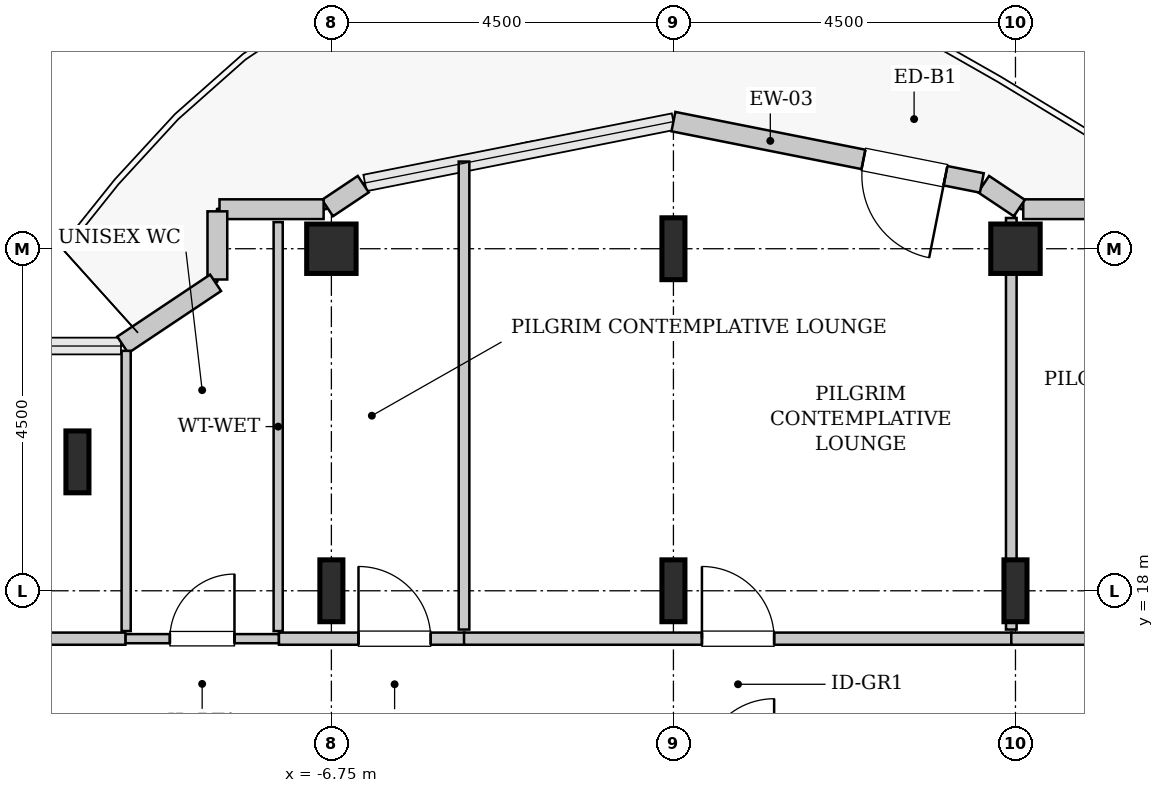
"""IFC4 building model, lengths in metres.
Left out: names, types, materials, properties, quantities, classifications, styles, units other than length and angle.
Written with IfcOpenShell. Run it as: python <this file> out.ifc"""

import sys

from ifc_helpers import new_model, si_unit, direction, frame, frame_2d, origin, origin_2d, place, context, subcontext, project, spatial, rectangle, hollow_rectangle, i_section, extrude, source, transform, mapped, element, fill, save


model = new_model("IFC4")
c1 = context("Model", 3, precision=1e-05, world=origin(), true_north=direction((0.0, 1.0)))
c2 = subcontext(c1, "Body", "Model", "MODEL_VIEW")
j1 = project(units=[si_unit("LENGTHUNIT", "METRE"), si_unit("PLANEANGLEUNIT", "RADIAN")], contexts=[c1])
p1 = place(None, origin())
s1 = spatial("IfcSite", under=j1, at=p1, CompositionType="ELEMENT")
p2 = place(p1, origin())
s2 = spatial("IfcBuilding", under=s1, at=p2, CompositionType="ELEMENT")
p3 = place(p2, frame((0.0, 0.0, 248.4)))
s3 = spatial("IfcBuildingStorey", under=s2, at=p3, CompositionType="ELEMENT", Elevation=248.4)
m1 = source(origin(), c2, "Body", "SweptSolid", [
    extrude(i_section(OverallWidth=0.303, OverallDepth=0.814, WebThickness=0.021, FlangeThickness=0.04, FilletRadius=0.03, at=origin_2d()), origin(), (0.0, 0.0, 1.0), 3.8),
])
for number, where, z_axis, x_axis in (
    (1, (-10.091, 19.696, 0.0), (0.0, 0.0, 1.0), (1.0, 0.0, 0.0)),
    (2, (-6.75, 18.0, 0.0), (0.0, 0.0, 1.0), (1.0, 0.0, 0.0)),
):
    element("IfcColumn", number, at=place(p3, frame(where, z_axis=z_axis, x_axis=x_axis)), inside=s3, PredefinedType="COLUMN", context=c2, shape_type="MappedRepresentation", body=[
        mapped(m1, transform((0.0, 0.0, 0.0), x_axis=(1.0, 0.0, 0.0), y_axis=(0.0, 1.0, 0.0), z_axis=(0.0, 0.0, 1.0), scale=1.0)),
    ])
m2 = source(origin(), c2, "Body", "SweptSolid", [
    extrude(hollow_rectangle(XDim=0.65, YDim=0.65, WallThickness=0.032, InnerFilletRadius=0.032, OuterFilletRadius=0.064, at=origin_2d()), origin(), (0.0, 0.0, 1.0), 3.8),
])
p4 = place(p3, frame((-6.75, 22.5, 0.0), z_axis=(0.0, 0.0, 1.0), x_axis=(1.0, 0.0, 0.0)))
e3 = element("IfcColumn", 3, at=p4, inside=s3, PredefinedType="COLUMN", context=c2, shape_type="MappedRepresentation", body=[
    mapped(m2, transform((0.0, 0.0, 0.0), x_axis=(1.0, 0.0, 0.0), y_axis=(0.0, 1.0, 0.0), z_axis=(0.0, 0.0, 1.0), scale=1.0)),
])
for number, where, z_axis, x_axis in (
    (4, (-2.25, 18.0, 0.0), (0.0, 0.0, 1.0), (1.0, 0.0, 0.0)),
    (5, (-2.25, 22.5, 0.0), (0.0, 0.0, 1.0), (1.0, 0.0, 0.0)),
    (6, (2.25, 18.0, 0.0), (0.0, 0.0, 1.0), (1.0, 0.0, 0.0)),
):
    element("IfcColumn", number, at=place(p3, frame(where, z_axis=z_axis, x_axis=x_axis)), inside=s3, PredefinedType="COLUMN", context=c2, shape_type="MappedRepresentation", body=[
        mapped(m1, transform((0.0, 0.0, 0.0), x_axis=(1.0, 0.0, 0.0), y_axis=(0.0, 1.0, 0.0), z_axis=(0.0, 0.0, 1.0), scale=1.0)),
    ])
p5 = place(p3, frame((2.25, 22.5, 0.0), z_axis=(0.0, 0.0, 1.0), x_axis=(1.0, 0.0, 0.0)))
e7 = element("IfcColumn", 7, at=p5, inside=s3, PredefinedType="COLUMN", context=c2, shape_type="MappedRepresentation", body=[
    mapped(m2, transform((0.0, 0.0, 0.0), x_axis=(1.0, 0.0, 0.0), y_axis=(0.0, 1.0, 0.0), z_axis=(0.0, 0.0, 1.0), scale=1.0)),
])
m3 = source(origin(), c2, "Body", "SweptSolid", [
    extrude(rectangle(XDim=1.37, YDim=0.26, at=frame_2d((0.685, 0.0))), origin(), (0.0, 0.0, 1.0), 3.55),
])
p6 = place(p3, frame((3.722, 23.02, 0.0), z_axis=(0.0, 0.0, 1.0), x_axis=(-1.0, 0.0, 0.0)))
e8 = element("IfcWall", 8, at=p6, inside=s3, PredefinedType="SOLIDWALL", context=c2, shape_type="MappedRepresentation", body=[
    mapped(m3, transform((0.0, 0.0, 0.0), x_axis=(1.0, 0.0, 0.0), y_axis=(0.0, 1.0, 0.0), z_axis=(0.0, 0.0, 1.0), scale=1.0)),
])
m4 = source(origin(), c2, "Body", "SweptSolid", [
    extrude(rectangle(XDim=0.565, YDim=0.26, at=frame_2d((0.283, 0.0))), origin(), (0.0, 0.0, 1.0), 3.55),
])
p7 = place(p3, frame((2.301, 23.036, 0.0), z_axis=(0.0, 0.0, 1.0), x_axis=(-0.831651492666, 0.555297933317, 0.0)))
e9 = element("IfcWall", 9, at=p7, inside=s3, PredefinedType="SOLIDWALL", context=c2, shape_type="MappedRepresentation", body=[
    mapped(m4, transform((0.0, 0.0, 0.0), x_axis=(1.0, 0.0, 0.0), y_axis=(0.0, 1.0, 0.0), z_axis=(0.0, 0.0, 1.0), scale=1.0)),
])
m5 = source(origin(), c2, "Body", "SweptSolid", [
    extrude(rectangle(XDim=4.137, YDim=0.26, at=frame_2d((2.068, 0.0))), origin(), (0.0, 0.0, 1.0), 3.55),
])
p8 = place(p3, frame((1.807, 23.365, 0.0), z_axis=(0.0, 0.0, 1.0), x_axis=(-0.980782170794, 0.195105954428, 0.0)))
e10 = element("IfcWall", 10, at=p8, inside=s3, PredefinedType="SOLIDWALL", context=c2, shape_type="MappedRepresentation", body=[
    mapped(m5, transform((0.0, 0.0, 0.0), x_axis=(1.0, 0.0, 0.0), y_axis=(0.0, 1.0, 0.0), z_axis=(0.0, 0.0, 1.0), scale=1.0)),
])
p9 = place(p8, frame((0.488, 0.0, 0.0)))
e11 = element("IfcOpeningElement", 11, at=p9, cuts=e10, PredefinedType="OPENING", context=c2, shape_type="SweptSolid", body=[
    extrude(rectangle(XDim=1.1, YDim=2.2, at=frame_2d((0.55, 1.1))), frame((0.0, 0.14, 0.0), z_axis=(0.0, -1.0, 0.0), x_axis=(1.0, 0.0, 0.0)), (0.0, 0.0, 1.0), 0.28),
])
p10 = place(p3, frame((-6.331, 23.35, 0.0), z_axis=(0.0, 0.0, 1.0), x_axis=(-0.831651492666, -0.555297933317, 0.0)))
e12 = element("IfcWall", 12, at=p10, inside=s3, PredefinedType="SOLIDWALL", context=c2, shape_type="MappedRepresentation", body=[
    mapped(m4, transform((0.0, 0.0, 0.0), x_axis=(1.0, 0.0, 0.0), y_axis=(0.0, 1.0, 0.0), z_axis=(0.0, 0.0, 1.0), scale=1.0)),
])
p11 = place(p3, frame((-6.852, 23.02, 0.0), z_axis=(0.0, 0.0, 1.0), x_axis=(-1.0, 0.0, 0.0)))
e13 = element("IfcWall", 13, at=p11, inside=s3, PredefinedType="SOLIDWALL", context=c2, shape_type="MappedRepresentation", body=[
    mapped(m3, transform((0.0, 0.0, 0.0), x_axis=(1.0, 0.0, 0.0), y_axis=(0.0, 1.0, 0.0), z_axis=(0.0, 0.0, 1.0), scale=1.0)),
])
m6 = source(origin(), c2, "Body", "SweptSolid", [
    extrude(rectangle(XDim=0.897, YDim=0.26, at=frame_2d((0.448, 0.0))), origin(), (0.0, 0.0, 1.0), 3.55),
])
p12 = place(p3, frame((-8.25, 22.992, 0.0), z_axis=(0.0, 0.0, 1.0), x_axis=(0.0, -1.0, 0.0)))
e14 = element("IfcWall", 14, at=p12, inside=s3, PredefinedType="SOLIDWALL", context=c2, shape_type="MappedRepresentation", body=[
    mapped(m6, transform((0.0, 0.0, 0.0), x_axis=(1.0, 0.0, 0.0), y_axis=(0.0, 1.0, 0.0), z_axis=(0.0, 0.0, 1.0), scale=1.0)),
])
m7 = source(origin(), c2, "Body", "SweptSolid", [
    extrude(rectangle(XDim=1.469, YDim=0.26, at=frame_2d((0.734, 0.0))), origin(), (0.0, 0.0, 1.0), 3.55),
])
p13 = place(p3, frame((-8.273, 22.052, 0.0), z_axis=(0.0, 0.0, 1.0), x_axis=(-0.831461760506, -0.555581983884, 0.0)))
e15 = element("IfcWall", 15, at=p13, inside=s3, PredefinedType="SOLIDWALL", context=c2, shape_type="MappedRepresentation", body=[
    mapped(m7, transform((0.0, 0.0, 0.0), x_axis=(1.0, 0.0, 0.0), y_axis=(0.0, 1.0, 0.0), z_axis=(0.0, 0.0, 1.0), scale=1.0)),
])
m8 = source(origin(), c2, "Body", "SweptSolid", [
    extrude(rectangle(XDim=2.02, YDim=0.12, at=frame_2d((1.01, 0.0))), origin(), (0.0, 0.0, 1.0), 3.535),
])
p14 = place(p3, frame((-9.46, 17.37, 0.0), z_axis=(0.0, 0.0, 1.0), x_axis=(1.0, 0.0, 0.0)))
e16 = element("IfcWall", 16, at=p14, inside=s3, PredefinedType="PLUMBINGWALL", context=c2, shape_type="MappedRepresentation", body=[
    mapped(m8, transform((0.0, 0.0, 0.0), x_axis=(1.0, 0.0, 0.0), y_axis=(0.0, 1.0, 0.0), z_axis=(0.0, 0.0, 1.0), scale=1.0)),
])
p15 = place(p14, frame((0.585, 0.0, 0.0)))
e17 = element("IfcOpeningElement", 17, at=p15, cuts=e16, PredefinedType="OPENING", context=c2, shape_type="SweptSolid", body=[
    extrude(rectangle(XDim=0.85, YDim=2.1, at=frame_2d((0.425, 1.05))), frame((0.0, 0.07, 0.0), z_axis=(0.0, -1.0, 0.0), x_axis=(1.0, 0.0, 0.0)), (0.0, 0.0, 1.0), 0.14),
])
m9 = source(origin(), c2, "Body", "SweptSolid", [
    extrude(rectangle(XDim=5.38, YDim=0.12, at=frame_2d((2.69, 0.0))), origin(), (0.0, 0.0, 1.0), 3.535),
])
p16 = place(p3, frame((-7.45, 17.47, 0.0), z_axis=(0.0, 0.0, 1.0), x_axis=(0.0, 1.0, 0.0)))
e18 = element("IfcWall", 18, at=p16, inside=s3, PredefinedType="PLUMBINGWALL", context=c2, shape_type="MappedRepresentation", body=[
    mapped(m9, transform((0.0, 0.0, 0.0), x_axis=(1.0, 0.0, 0.0), y_axis=(0.0, 1.0, 0.0), z_axis=(0.0, 0.0, 1.0), scale=1.0)),
])
m10 = source(origin(), c2, "Body", "SweptSolid", [
    extrude(rectangle(XDim=3.687, YDim=0.12, at=frame_2d((1.843, 0.0))), origin(), (0.0, 0.0, 1.0), 3.535),
])
p17 = place(p3, frame((-9.45, 17.47, 0.0), z_axis=(0.0, 0.0, 1.0), x_axis=(0.0, 1.0, 0.0)))
e19 = element("IfcWall", 19, at=p17, inside=s3, PredefinedType="PLUMBINGWALL", context=c2, shape_type="MappedRepresentation", body=[
    mapped(m10, transform((0.0, 0.0, 0.0), x_axis=(1.0, 0.0, 0.0), y_axis=(0.0, 1.0, 0.0), z_axis=(0.0, 0.0, 1.0), scale=1.0)),
])
m11 = source(origin(), c2, "Body", "SweptSolid", [
    extrude(rectangle(XDim=2.445, YDim=0.16, at=frame_2d((1.222, 0.0))), origin(), (0.0, 0.0, 1.0), 3.535),
])
p18 = place(p3, frame((-7.44, 17.37, 0.0), z_axis=(0.0, 0.0, 1.0), x_axis=(1.0, 0.0, 0.0)))
e20 = element("IfcWall", 20, at=p18, inside=s3, PredefinedType="PARTITIONING", context=c2, shape_type="MappedRepresentation", body=[
    mapped(m11, transform((0.0, 0.0, 0.0), x_axis=(1.0, 0.0, 0.0), y_axis=(0.0, 1.0, 0.0), z_axis=(0.0, 0.0, 1.0), scale=1.0)),
])
p19 = place(p18, frame((1.047, 0.0, 0.0)))
e21 = element("IfcOpeningElement", 21, at=p19, cuts=e20, PredefinedType="OPENING", context=c2, shape_type="SweptSolid", body=[
    extrude(rectangle(XDim=0.95, YDim=2.1, at=frame_2d((0.475, 1.05))), frame((0.0, 0.09, 0.0), z_axis=(0.0, -1.0, 0.0), x_axis=(1.0, 0.0, 0.0)), (0.0, 0.0, 1.0), 0.18),
])
m12 = source(origin(), c2, "Body", "SweptSolid", [
    extrude(rectangle(XDim=6.157, YDim=0.14, at=frame_2d((3.078, 0.0))), origin(), (0.0, 0.0, 1.0), 3.535),
])
p20 = place(p3, frame((-5.005, 17.49, 0.0), z_axis=(0.0, 0.0, 1.0), x_axis=(0.0, 1.0, 0.0)))
e22 = element("IfcWall", 22, at=p20, inside=s3, PredefinedType="PARTITIONING", context=c2, shape_type="MappedRepresentation", body=[
    mapped(m12, transform((0.0, 0.0, 0.0), x_axis=(1.0, 0.0, 0.0), y_axis=(0.0, 1.0, 0.0), z_axis=(0.0, 0.0, 1.0), scale=1.0)),
])
m13 = source(origin(), c2, "Body", "SweptSolid", [
    extrude(rectangle(XDim=4.16, YDim=0.16, at=frame_2d((2.08, 0.0))), origin(), (0.0, 0.0, 1.0), 3.535),
])
p21 = place(p3, frame((-13.62, 17.37, 0.0), z_axis=(0.0, 0.0, 1.0), x_axis=(1.0, 0.0, 0.0)))
e23 = element("IfcWall", 23, at=p21, inside=s3, PredefinedType="PARTITIONING", context=c2, shape_type="MappedRepresentation", body=[
    mapped(m13, transform((0.0, 0.0, 0.0), x_axis=(1.0, 0.0, 0.0), y_axis=(0.0, 1.0, 0.0), z_axis=(0.0, 0.0, 1.0), scale=1.0)),
])
p22 = place(p21, frame((0.969, 0.0, 0.0)))
e24 = element("IfcOpeningElement", 24, at=p22, cuts=e23, PredefinedType="OPENING", context=c2, shape_type="SweptSolid", body=[
    extrude(rectangle(XDim=0.95, YDim=2.1, at=frame_2d((0.475, 1.05))), frame((0.0, 0.09, 0.0), z_axis=(0.0, -1.0, 0.0), x_axis=(1.0, 0.0, 0.0)), (0.0, 0.0, 1.0), 0.18),
])
m14 = source(origin(), c2, "Body", "SweptSolid", [
    extrude(rectangle(XDim=7.21, YDim=0.16, at=frame_2d((3.605, 0.0))), origin(), (0.0, 0.0, 1.0), 3.535),
])
p23 = place(p3, frame((-5.005, 17.37, 0.0), z_axis=(0.0, 0.0, 1.0), x_axis=(1.0, 0.0, 0.0)))
e25 = element("IfcWall", 25, at=p23, inside=s3, PredefinedType="PARTITIONING", context=c2, shape_type="MappedRepresentation", body=[
    mapped(m14, transform((0.0, 0.0, 0.0), x_axis=(1.0, 0.0, 0.0), y_axis=(0.0, 1.0, 0.0), z_axis=(0.0, 0.0, 1.0), scale=1.0)),
])
p24 = place(p23, frame((3.13, 0.0, 0.0)))
e26 = element("IfcOpeningElement", 26, at=p24, cuts=e25, PredefinedType="OPENING", context=c2, shape_type="SweptSolid", body=[
    extrude(rectangle(XDim=0.95, YDim=2.1, at=frame_2d((0.475, 1.05))), frame((0.0, 0.09, 0.0), z_axis=(0.0, -1.0, 0.0), x_axis=(1.0, 0.0, 0.0)), (0.0, 0.0, 1.0), 0.18),
])
m15 = source(origin(), c2, "Body", "SweptSolid", [
    extrude(rectangle(XDim=5.414, YDim=0.14, at=frame_2d((2.707, 0.0))), origin(), (0.0, 0.0, 1.0), 2.925),
])
p25 = place(p3, frame((2.195, 17.49, 0.0), z_axis=(0.0, 0.0, 1.0), x_axis=(0.0, 1.0, 0.0)))
e27 = element("IfcWall", 27, at=p25, inside=s3, PredefinedType="PARTITIONING", context=c2, shape_type="MappedRepresentation", body=[
    mapped(m15, transform((0.0, 0.0, 0.0), x_axis=(1.0, 0.0, 0.0), y_axis=(0.0, 1.0, 0.0), z_axis=(0.0, 0.0, 1.0), scale=1.0)),
])
m16 = source(origin(), c2, "Body", "SweptSolid", [
    extrude(rectangle(XDim=6.21, YDim=0.16, at=frame_2d((3.105, 0.0))), origin(), (0.0, 0.0, 1.0), 3.535),
])
p26 = place(p3, frame((2.195, 17.37, 0.0), z_axis=(0.0, 0.0, 1.0), x_axis=(1.0, 0.0, 0.0)))
e28 = element("IfcWall", 28, at=p26, inside=s3, PredefinedType="PARTITIONING", context=c2, shape_type="MappedRepresentation", body=[
    mapped(m16, transform((0.0, 0.0, 0.0), x_axis=(1.0, 0.0, 0.0), y_axis=(0.0, 1.0, 0.0), z_axis=(0.0, 0.0, 1.0), scale=1.0)),
])
p27 = place(p26, frame((2.63, 0.0, 0.0)))
e29 = element("IfcOpeningElement", 29, at=p27, cuts=e28, PredefinedType="OPENING", context=c2, shape_type="SweptSolid", body=[
    extrude(rectangle(XDim=0.95, YDim=2.1, at=frame_2d((0.475, 1.05))), frame((0.0, 0.09, 0.0), z_axis=(0.0, -1.0, 0.0), x_axis=(1.0, 0.0, 0.0)), (0.0, 0.0, 1.0), 0.18),
])
m17 = source(origin(), c2, "Body", "SweptSolid", [
    extrude(rectangle(XDim=1.1, YDim=2.2, at=frame_2d((0.55, 1.1))), frame((0.0, 0.025, 0.0), z_axis=(0.0, -1.0, 0.0), x_axis=(1.0, 0.0, 0.0)), (0.0, 0.0, 1.0), 0.05),
])
p28 = place(p9, origin())
e30 = element("IfcDoor", 30, at=p28, inside=s3, OperationType="SINGLE_SWING_LEFT", PredefinedType="DOOR", context=c2, shape_type="MappedRepresentation", body=[
    mapped(m17, transform((0.0, 0.0, 0.0), x_axis=(1.0, 0.0, 0.0), y_axis=(0.0, 1.0, 0.0), z_axis=(0.0, 0.0, 1.0), scale=1.0)),
])
fill(e11, e30)
m18 = source(origin(), c2, "Body", "SweptSolid", [
    extrude(rectangle(XDim=0.85, YDim=2.1, at=frame_2d((0.425, 1.05))), frame((0.0, 0.025, 0.0), z_axis=(0.0, -1.0, 0.0), x_axis=(1.0, 0.0, 0.0)), (0.0, 0.0, 1.0), 0.05),
])
p29 = place(p15, origin())
e31 = element("IfcDoor", 31, at=p29, inside=s3, OperationType="SINGLE_SWING_RIGHT", PredefinedType="DOOR", context=c2, shape_type="MappedRepresentation", body=[
    mapped(m18, transform((0.0, 0.0, 0.0), x_axis=(1.0, 0.0, 0.0), y_axis=(0.0, 1.0, 0.0), z_axis=(0.0, 0.0, 1.0), scale=1.0)),
])
fill(e17, e31)
m19 = source(origin(), c2, "Body", "SweptSolid", [
    extrude(rectangle(XDim=0.95, YDim=2.1, at=frame_2d((0.475, 1.05))), frame((0.0, 0.025, 0.0), z_axis=(0.0, -1.0, 0.0), x_axis=(1.0, 0.0, 0.0)), (0.0, 0.0, 1.0), 0.05),
])
p30 = place(p19, origin())
e32 = element("IfcDoor", 32, at=p30, inside=s3, OperationType="SINGLE_SWING_LEFT", PredefinedType="DOOR", context=c2, shape_type="MappedRepresentation", body=[
    mapped(m19, transform((0.0, 0.0, 0.0), x_axis=(1.0, 0.0, 0.0), y_axis=(0.0, 1.0, 0.0), z_axis=(0.0, 0.0, 1.0), scale=1.0)),
])
fill(e21, e32)
p31 = place(p24, origin())
e33 = element("IfcDoor", 33, at=p31, inside=s3, OperationType="SINGLE_SWING_LEFT", PredefinedType="DOOR", context=c2, shape_type="MappedRepresentation", body=[
    mapped(m19, transform((0.0, 0.0, 0.0), x_axis=(1.0, 0.0, 0.0), y_axis=(0.0, 1.0, 0.0), z_axis=(0.0, 0.0, 1.0), scale=1.0)),
])
fill(e26, e33)
save(model, sys.argv[1])
